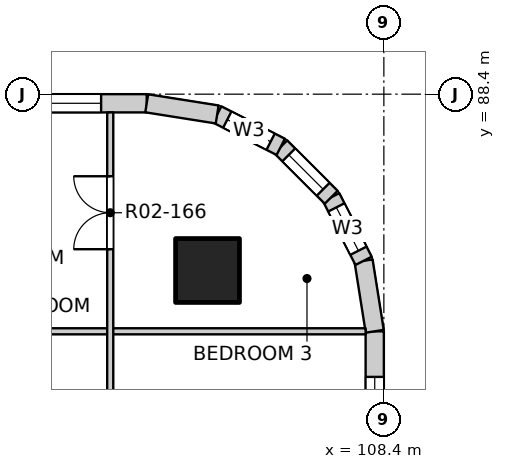
"""IFC4 building model, lengths in metres.
Left out: names, types, materials, properties, quantities, classifications, styles, units other than length and angle.
Written with IfcOpenShell. Run it as: python <this file> out.ifc"""

import sys

from ifc_helpers import new_model, si_unit, direction, frame, frame_2d, origin, origin_2d, place, context, subcontext, project, spatial, rectangle, extrude, element, fill, save


model = new_model("IFC4")
c1 = context("Model", 3, precision=1e-05, world=origin(), true_north=direction((0.0, 1.0)))
c2 = subcontext(c1, "Body", "Model", "MODEL_VIEW")
j1 = project(units=[si_unit("LENGTHUNIT", "METRE"), si_unit("PLANEANGLEUNIT", "RADIAN")], contexts=[c1])
p1 = place(None, origin())
s1 = spatial("IfcSite", under=j1, at=p1, CompositionType="ELEMENT")
p2 = place(p1, origin())
s2 = spatial("IfcBuilding", under=s1, at=p2, CompositionType="ELEMENT")
p3 = place(p2, frame((0.0, 0.0, 36.5)))
s3 = spatial("IfcBuildingStorey", under=s2, at=p3, CompositionType="ELEMENT", Elevation=36.5)
p4 = place(p3, frame((105.5, 85.5, -0.25), z_axis=(0.0, 0.0, 1.0), x_axis=(1.0, 0.0, 0.0)))
e1 = element("IfcColumn", 1, at=p4, inside=s3, PredefinedType="COLUMN", context=c2, shape_type="SweptSolid", body=[
    extrude(rectangle(XDim=1.05, YDim=1.05, at=origin_2d()), origin(), (0.0, 0.0, 1.0), 3.4),
])
p5 = place(p3, frame((108.25, 81.125, 0.0), z_axis=(0.0, 0.0, 1.0), x_axis=(0.0, 1.0, 0.0)))
e2 = element("IfcWall", 2, at=p5, inside=s3, PredefinedType="SOLIDWALL", context=c2, shape_type="SweptSolid", body=[
    extrude(rectangle(XDim=3.375, YDim=0.3, at=frame_2d((1.688, 0.0))), origin(), (0.0, 0.0, 1.0), 2.7),
])
p6 = place(p5, frame((0.225, 0.0, 0.9)))
e3 = element("IfcOpeningElement", 3, at=p6, cuts=e2, PredefinedType="OPENING", context=c2, shape_type="SweptSolid", body=[
    extrude(rectangle(XDim=2.4, YDim=1.8, at=frame_2d((1.2, 0.9))), frame((0.0, 0.16, 0.0), z_axis=(0.0, -1.0, 0.0), x_axis=(1.0, 0.0, 0.0)), (0.0, 0.0, 1.0), 0.32),
])
p7 = place(p3, frame((101.125, 88.25, 0.0), z_axis=(0.0, 0.0, 1.0), x_axis=(1.0, 0.0, 0.0)))
e4 = element("IfcWall", 4, at=p7, inside=s3, PredefinedType="SOLIDWALL", context=c2, shape_type="SweptSolid", body=[
    extrude(rectangle(XDim=3.375, YDim=0.3, at=frame_2d((1.688, 0.0))), origin(), (0.0, 0.0, 1.0), 2.7),
])
p8 = place(p7, frame((0.225, 0.0, 0.9)))
e5 = element("IfcOpeningElement", 5, at=p8, cuts=e4, PredefinedType="OPENING", context=c2, shape_type="SweptSolid", body=[
    extrude(rectangle(XDim=2.4, YDim=1.8, at=frame_2d((1.2, 0.9))), frame((0.0, 0.16, 0.0), z_axis=(0.0, -1.0, 0.0), x_axis=(1.0, 0.0, 0.0)), (0.0, 0.0, 1.0), 0.32),
])
p9 = place(p3, frame((108.25, 84.5, 0.0), z_axis=(0.0, 0.0, 1.0), x_axis=(-0.156496880861, 0.987678452879, 0.0)))
e6 = element("IfcWall", 6, at=p9, inside=s3, PredefinedType="SOLIDWALL", context=c2, shape_type="SweptSolid", body=[
    extrude(rectangle(XDim=1.173, YDim=0.3, at=frame_2d((0.586, 0.0))), origin(), (0.0, 0.0, 1.0), 2.7),
])
p10 = place(p3, frame((108.066, 85.659, 0.0), z_axis=(0.0, 0.0, 1.0), x_axis=(-0.454025524128, 0.890988677504, 0.0)))
e7 = element("IfcWall", 7, at=p10, inside=s3, PredefinedType="SOLIDWALL", context=c2, shape_type="SweptSolid", body=[
    extrude(rectangle(XDim=1.173, YDim=0.3, at=frame_2d((0.587, 0.0))), origin(), (0.0, 0.0, 1.0), 2.7),
])
p11 = place(p10, frame((0.187, 0.0, 0.9)))
e8 = element("IfcOpeningElement", 8, at=p11, cuts=e7, PredefinedType="OPENING", context=c2, shape_type="SweptSolid", body=[
    extrude(rectangle(XDim=0.8, YDim=1.2, at=frame_2d((0.4, 0.6))), frame((0.0, 0.16, 0.0), z_axis=(0.0, -1.0, 0.0), x_axis=(1.0, 0.0, 0.0)), (0.0, 0.0, 1.0), 0.32),
])
p12 = place(p3, frame((107.534, 86.704, 0.0), z_axis=(0.0, 0.0, 1.0), x_axis=(-0.707106781187, 0.707106781187, 0.0)))
e9 = element("IfcWall", 9, at=p12, inside=s3, PredefinedType="SOLIDWALL", context=c2, shape_type="SweptSolid", body=[
    extrude(rectangle(XDim=1.173, YDim=0.3, at=frame_2d((0.586, 0.0))), origin(), (0.0, 0.0, 1.0), 2.7),
])
p13 = place(p12, frame((0.187, 0.0, 0.9)))
e10 = element("IfcOpeningElement", 10, at=p13, cuts=e9, PredefinedType="OPENING", context=c2, shape_type="SweptSolid", body=[
    extrude(rectangle(XDim=0.8, YDim=1.2, at=frame_2d((0.4, 0.6))), frame((0.0, 0.16, 0.0), z_axis=(0.0, -1.0, 0.0), x_axis=(1.0, 0.0, 0.0)), (0.0, 0.0, 1.0), 0.32),
])
p14 = place(p3, frame((106.704, 87.534, 0.0), z_axis=(0.0, 0.0, 1.0), x_axis=(-0.890988677504, 0.454025524128, 0.0)))
e11 = element("IfcWall", 11, at=p14, inside=s3, PredefinedType="SOLIDWALL", context=c2, shape_type="SweptSolid", body=[
    extrude(rectangle(XDim=1.173, YDim=0.3, at=frame_2d((0.587, 0.0))), origin(), (0.0, 0.0, 1.0), 2.7),
])
p15 = place(p14, frame((0.187, 0.0, 0.9)))
e12 = element("IfcOpeningElement", 12, at=p15, cuts=e11, PredefinedType="OPENING", context=c2, shape_type="SweptSolid", body=[
    extrude(rectangle(XDim=0.8, YDim=1.2, at=frame_2d((0.4, 0.6))), frame((0.0, 0.16, 0.0), z_axis=(0.0, -1.0, 0.0), x_axis=(1.0, 0.0, 0.0)), (0.0, 0.0, 1.0), 0.32),
])
p16 = place(p3, frame((105.659, 88.066, 0.0), z_axis=(0.0, 0.0, 1.0), x_axis=(-0.987678452879, 0.156496880861, 0.0)))
e13 = element("IfcWall", 13, at=p16, inside=s3, PredefinedType="SOLIDWALL", context=c2, shape_type="SweptSolid", body=[
    extrude(rectangle(XDim=1.173, YDim=0.3, at=frame_2d((0.586, 0.0))), origin(), (0.0, 0.0, 1.0), 2.7),
])
p17 = place(p3, frame((96.6, 84.5, 0.0), z_axis=(0.0, 0.0, 1.0), x_axis=(1.0, 0.0, 0.0)))
e14 = element("IfcWall", 14, at=p17, inside=s3, PredefinedType="PARTITIONING", context=c2, shape_type="SweptSolid", body=[
    extrude(rectangle(XDim=11.5, YDim=0.1, at=frame_2d((5.75, 0.0))), origin(), (0.0, 0.0, 1.0), 3.15),
])
p18 = place(p17, frame((2.635, 0.0, 0.0)))
e15 = element("IfcOpeningElement", 15, at=p18, cuts=e14, PredefinedType="OPENING", context=c2, shape_type="SweptSolid", body=[
    extrude(rectangle(XDim=0.9, YDim=2.1, at=frame_2d((0.45, 1.05))), frame((0.0, 0.06, 0.0), z_axis=(0.0, -1.0, 0.0), x_axis=(1.0, 0.0, 0.0)), (0.0, 0.0, 1.0), 0.12),
])
p19 = place(p3, frame((103.9, 72.9, 0.0), z_axis=(0.0, 0.0, 1.0), x_axis=(0.0, 1.0, 0.0)))
e16 = element("IfcWall", 16, at=p19, inside=s3, PredefinedType="PARTITIONING", context=c2, shape_type="SweptSolid", body=[
    extrude(rectangle(XDim=15.2, YDim=0.1, at=frame_2d((7.6, 0.0))), origin(), (0.0, 0.0, 1.0), 3.15),
])
p20 = place(p19, frame((0.425, 0.0, 0.0)))
e17 = element("IfcOpeningElement", 17, at=p20, cuts=e16, PredefinedType="OPENING", context=c2, shape_type="SweptSolid", body=[
    extrude(rectangle(XDim=0.9, YDim=2.1, at=frame_2d((0.45, 1.05))), frame((0.0, 0.06, 0.0), z_axis=(0.0, -1.0, 0.0), x_axis=(1.0, 0.0, 0.0)), (0.0, 0.0, 1.0), 0.12),
])
p21 = place(p19, frame((2.375, 0.0, 0.0)))
e18 = element("IfcOpeningElement", 18, at=p21, cuts=e16, PredefinedType="OPENING", context=c2, shape_type="SweptSolid", body=[
    extrude(rectangle(XDim=0.9, YDim=2.1, at=frame_2d((0.45, 1.05))), frame((0.0, 0.06, 0.0), z_axis=(0.0, -1.0, 0.0), x_axis=(1.0, 0.0, 0.0)), (0.0, 0.0, 1.0), 0.12),
])
p22 = place(p19, frame((4.325, 0.0, 0.0)))
e19 = element("IfcOpeningElement", 19, at=p22, cuts=e16, PredefinedType="OPENING", context=c2, shape_type="SweptSolid", body=[
    extrude(rectangle(XDim=0.9, YDim=2.1, at=frame_2d((0.45, 1.05))), frame((0.0, 0.06, 0.0), z_axis=(0.0, -1.0, 0.0), x_axis=(1.0, 0.0, 0.0)), (0.0, 0.0, 1.0), 0.12),
])
p23 = place(p19, frame((6.275, 0.0, 0.0)))
e20 = element("IfcOpeningElement", 20, at=p23, cuts=e16, PredefinedType="OPENING", context=c2, shape_type="SweptSolid", body=[
    extrude(rectangle(XDim=0.9, YDim=2.1, at=frame_2d((0.45, 1.05))), frame((0.0, 0.06, 0.0), z_axis=(0.0, -1.0, 0.0), x_axis=(1.0, 0.0, 0.0)), (0.0, 0.0, 1.0), 0.12),
])
p24 = place(p19, frame((9.05, 0.0, 0.0)))
e21 = element("IfcOpeningElement", 21, at=p24, cuts=e16, PredefinedType="OPENING", context=c2, shape_type="SweptSolid", body=[
    extrude(rectangle(XDim=1.2, YDim=2.1, at=frame_2d((0.6, 1.05))), frame((0.0, 0.06, 0.0), z_axis=(0.0, -1.0, 0.0), x_axis=(1.0, 0.0, 0.0)), (0.0, 0.0, 1.0), 0.12),
])
p25 = place(p19, frame((12.95, 0.0, 0.0)))
e22 = element("IfcOpeningElement", 22, at=p25, cuts=e16, PredefinedType="OPENING", context=c2, shape_type="SweptSolid", body=[
    extrude(rectangle(XDim=1.2, YDim=2.1, at=frame_2d((0.6, 1.05))), frame((0.0, 0.06, 0.0), z_axis=(0.0, -1.0, 0.0), x_axis=(1.0, 0.0, 0.0)), (0.0, 0.0, 1.0), 0.12),
])
p26 = place(p6, origin())
e23 = element("IfcWindow", 23, at=p26, inside=s3, PartitioningType="DOUBLE_PANEL_VERTICAL", PredefinedType="WINDOW", context=c2, shape_type="SweptSolid", body=[
    extrude(rectangle(XDim=2.4, YDim=1.8, at=frame_2d((1.2, 0.9))), frame((0.0, 0.03, 0.0), z_axis=(0.0, -1.0, 0.0), x_axis=(1.0, 0.0, 0.0)), (0.0, 0.0, 1.0), 0.06),
])
fill(e3, e23)
p27 = place(p8, origin())
e24 = element("IfcWindow", 24, at=p27, inside=s3, PartitioningType="DOUBLE_PANEL_VERTICAL", PredefinedType="WINDOW", context=c2, shape_type="SweptSolid", body=[
    extrude(rectangle(XDim=2.4, YDim=1.8, at=frame_2d((1.2, 0.9))), frame((0.0, 0.03, 0.0), z_axis=(0.0, -1.0, 0.0), x_axis=(1.0, 0.0, 0.0)), (0.0, 0.0, 1.0), 0.06),
])
fill(e5, e24)
p28 = place(p11, origin())
e25 = element("IfcWindow", 25, at=p28, inside=s3, PartitioningType="SINGLE_PANEL", PredefinedType="WINDOW", context=c2, shape_type="SweptSolid", body=[
    extrude(rectangle(XDim=0.8, YDim=1.2, at=frame_2d((0.4, 0.6))), frame((0.0, 0.03, 0.0), z_axis=(0.0, -1.0, 0.0), x_axis=(1.0, 0.0, 0.0)), (0.0, 0.0, 1.0), 0.06),
])
fill(e8, e25)
p29 = place(p13, origin())
e26 = element("IfcWindow", 26, at=p29, inside=s3, PartitioningType="SINGLE_PANEL", PredefinedType="WINDOW", context=c2, shape_type="SweptSolid", body=[
    extrude(rectangle(XDim=0.8, YDim=1.2, at=frame_2d((0.4, 0.6))), frame((0.0, 0.03, 0.0), z_axis=(0.0, -1.0, 0.0), x_axis=(1.0, 0.0, 0.0)), (0.0, 0.0, 1.0), 0.06),
])
fill(e10, e26)
p30 = place(p15, origin())
e27 = element("IfcWindow", 27, at=p30, inside=s3, PartitioningType="SINGLE_PANEL", PredefinedType="WINDOW", context=c2, shape_type="SweptSolid", body=[
    extrude(rectangle(XDim=0.8, YDim=1.2, at=frame_2d((0.4, 0.6))), frame((0.0, 0.03, 0.0), z_axis=(0.0, -1.0, 0.0), x_axis=(1.0, 0.0, 0.0)), (0.0, 0.0, 1.0), 0.06),
])
fill(e12, e27)
p31 = place(p25, origin())
e28 = element("IfcDoor", 28, at=p31, inside=s3, OperationType="DOUBLE_DOOR_SINGLE_SWING", PredefinedType="DOOR", context=c2, shape_type="SweptSolid", body=[
    extrude(rectangle(XDim=1.2, YDim=2.1, at=frame_2d((0.6, 1.05))), frame((0.0, 0.025, 0.0), z_axis=(0.0, -1.0, 0.0), x_axis=(1.0, 0.0, 0.0)), (0.0, 0.0, 1.0), 0.05),
])
fill(e22, e28)
save(model, sys.argv[1])
